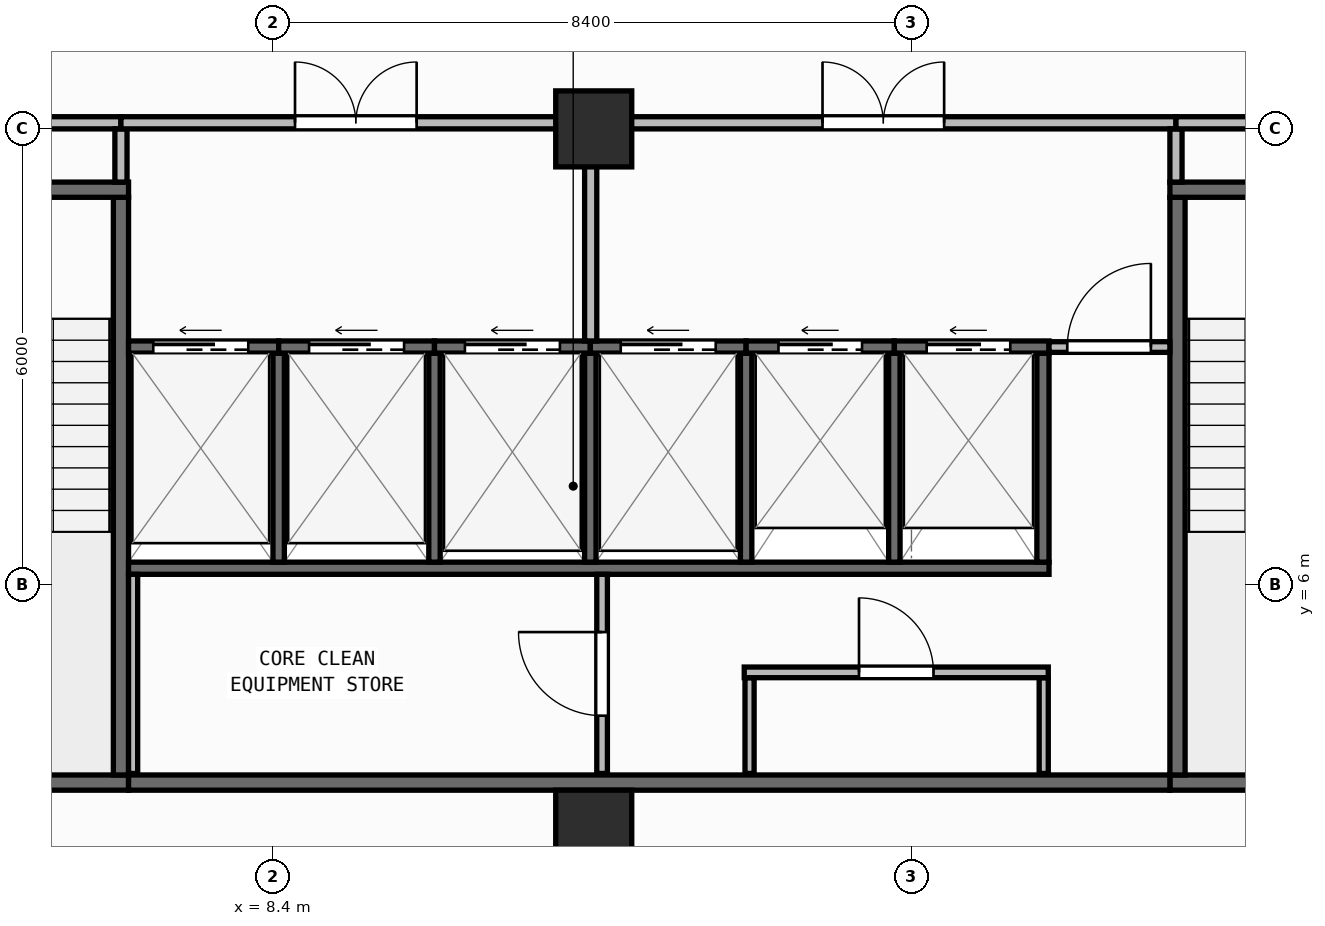
"""IFC4 building model, lengths in metres.
Left out: names, types, materials, properties, quantities, classifications, styles, units other than length and angle.
Written with IfcOpenShell. Run it as: python <this file> out.ifc"""

import sys

from ifc_helpers import new_model, si_unit, direction, frame, frame_2d, origin, origin_2d, place, context, subcontext, project, spatial, rectangle, extrude, element, fill, save


model = new_model("IFC4")
c1 = context("Model", 3, precision=1e-05, world=origin(), true_north=direction((0.0, 1.0)))
c2 = subcontext(c1, "Body", "Model", "MODEL_VIEW")
j1 = project(units=[si_unit("LENGTHUNIT", "METRE"), si_unit("PLANEANGLEUNIT", "RADIAN")], contexts=[c1])
p1 = place(None, origin())
s1 = spatial("IfcSite", under=j1, at=p1, CompositionType="ELEMENT")
p2 = place(p1, origin())
s2 = spatial("IfcBuilding", under=s1, at=p2, CompositionType="ELEMENT")
p3 = place(p2, frame((0.0, 0.0, 215.8)))
s3 = spatial("IfcBuildingStorey", under=s2, at=p3, CompositionType="ELEMENT", Elevation=215.8)
for number, where, z_axis, x_axis in (
    (1, (12.62, 2.8, 0.0), (0.0, 0.0, 1.0), (1.0, 0.0, 0.0)),
    (2, (12.62, 12.0, 0.0), (0.0, 0.0, 1.0), (1.0, 0.0, 0.0)),
):
    element("IfcColumn", number, at=place(p3, frame(where, z_axis=z_axis, x_axis=x_axis)), inside=s3, PredefinedType="COLUMN", context=c2, shape_type="SweptSolid", body=[
        extrude(rectangle(XDim=1.0, YDim=1.0, at=origin_2d()), origin(), (0.0, 0.0, 1.0), 3.95),
    ])
p4 = place(p3, frame((2.66, 0.174, 0.0), z_axis=(0.0, 0.0, 1.0), x_axis=(0.996634028439, 0.081979347142, 0.0)))
e3 = element("IfcWall", 3, at=p4, inside=s3, PredefinedType="STANDARD", context=c2, shape_type="SweptSolid", body=[
    extrude(rectangle(XDim=46.035, YDim=0.26, at=frame_2d((23.018, 0.0))), origin(), (0.0, 0.0, 1.0), 3.71),
])
p5 = place(p4, frame((21.817, 0.0, 0.9)))
e4 = element("IfcOpeningElement", 4, at=p5, cuts=e3, PredefinedType="OPENING", context=c2, shape_type="SweptSolid", body=[
    extrude(rectangle(XDim=2.4, YDim=1.65, at=frame_2d((1.2, 0.825))), frame((0.0, 0.14, 0.0), z_axis=(0.0, -1.0, 0.0), x_axis=(1.0, 0.0, 0.0)), (0.0, 0.0, 1.0), 0.28),
])
p6 = place(p3, frame((2.8, 3.4, 0.0), z_axis=(0.0, 0.0, 1.0), x_axis=(1.0, 0.0, 0.0)))
e5 = element("IfcWall", 5, at=p6, inside=s3, PredefinedType="SHEAR", context=c2, shape_type="SweptSolid", body=[
    extrude(rectangle(XDim=3.7, YDim=0.2, at=frame_2d((1.85, 0.0))), origin(), (0.0, 0.0, 1.0), 3.71),
])
p7 = place(p3, frame((6.4, 3.5, 0.0), z_axis=(0.0, 0.0, 1.0), x_axis=(0.0, 1.0, 0.0)))
e6 = element("IfcWall", 6, at=p7, inside=s3, PredefinedType="SHEAR", context=c2, shape_type="SweptSolid", body=[
    extrude(rectangle(XDim=7.6, YDim=0.2, at=frame_2d((3.8, 0.0))), origin(), (0.0, 0.0, 1.0), 3.71),
])
p8 = place(p3, frame((2.8, 11.2, 0.0), z_axis=(0.0, 0.0, 1.0), x_axis=(1.0, 0.0, 0.0)))
e7 = element("IfcWall", 7, at=p8, inside=s3, PredefinedType="SHEAR", context=c2, shape_type="SweptSolid", body=[
    extrude(rectangle(XDim=3.7, YDim=0.2, at=frame_2d((1.85, 0.0))), origin(), (0.0, 0.0, 1.0), 3.71),
])
p9 = place(p8, frame((1.2, 0.0, 0.0)))
e8 = element("IfcOpeningElement", 8, at=p9, cuts=e7, PredefinedType="OPENING", context=c2, shape_type="SweptSolid", body=[
    extrude(rectangle(XDim=1.3, YDim=2.15, at=frame_2d((0.65, 1.075))), frame((0.0, 0.11, 0.0), z_axis=(0.0, -1.0, 0.0), x_axis=(1.0, 0.0, 0.0)), (0.0, 0.0, 1.0), 0.22),
])
p10 = place(p3, frame((20.2, 3.4, 0.0), z_axis=(0.0, 0.0, 1.0), x_axis=(1.0, 0.0, 0.0)))
e9 = element("IfcWall", 9, at=p10, inside=s3, PredefinedType="SHEAR", context=c2, shape_type="SweptSolid", body=[
    extrude(rectangle(XDim=3.7, YDim=0.2, at=frame_2d((1.85, 0.0))), origin(), (0.0, 0.0, 1.0), 3.71),
])
p11 = place(p3, frame((20.3, 3.5, 0.0), z_axis=(0.0, 0.0, 1.0), x_axis=(0.0, 1.0, 0.0)))
e10 = element("IfcWall", 10, at=p11, inside=s3, PredefinedType="SHEAR", context=c2, shape_type="SweptSolid", body=[
    extrude(rectangle(XDim=7.6, YDim=0.2, at=frame_2d((3.8, 0.0))), origin(), (0.0, 0.0, 1.0), 3.71),
])
p12 = place(p3, frame((20.2, 11.2, 0.0), z_axis=(0.0, 0.0, 1.0), x_axis=(1.0, 0.0, 0.0)))
e11 = element("IfcWall", 11, at=p12, inside=s3, PredefinedType="SHEAR", context=c2, shape_type="SweptSolid", body=[
    extrude(rectangle(XDim=3.7, YDim=0.2, at=frame_2d((1.85, 0.0))), origin(), (0.0, 0.0, 1.0), 3.71),
])
p13 = place(p12, frame((1.2, 0.0, 0.0)))
e12 = element("IfcOpeningElement", 12, at=p13, cuts=e11, PredefinedType="OPENING", context=c2, shape_type="SweptSolid", body=[
    extrude(rectangle(XDim=1.3, YDim=2.15, at=frame_2d((0.65, 1.075))), frame((0.0, 0.11, 0.0), z_axis=(0.0, -1.0, 0.0), x_axis=(1.0, 0.0, 0.0)), (0.0, 0.0, 1.0), 0.22),
])
p14 = place(p3, frame((6.5, 3.4, 0.0), z_axis=(0.0, 0.0, 1.0), x_axis=(1.0, 0.0, 0.0)))
e13 = element("IfcWall", 13, at=p14, inside=s3, PredefinedType="SHEAR", context=c2, shape_type="SweptSolid", body=[
    extrude(rectangle(XDim=13.7, YDim=0.2, at=frame_2d((6.85, 0.0))), origin(), (0.0, 0.0, 1.0), 3.71),
])
p15 = place(p3, frame((6.5, 6.22, 0.0), z_axis=(0.0, 0.0, 1.0), x_axis=(1.0, 0.0, 0.0)))
e14 = element("IfcWall", 14, at=p15, inside=s3, PredefinedType="SHEAR", context=c2, shape_type="SweptSolid", body=[
    extrude(rectangle(XDim=12.11, YDim=0.16, at=frame_2d((6.055, 0.0))), origin(), (0.0, 0.0, 1.0), 3.71),
])
p16 = place(p3, frame((18.53, 6.3, 0.0), z_axis=(0.0, 0.0, 1.0), x_axis=(0.0, 1.0, 0.0)))
e15 = element("IfcWall", 15, at=p16, inside=s3, PredefinedType="SHEAR", context=c2, shape_type="SweptSolid", body=[
    extrude(rectangle(XDim=2.75, YDim=0.16, at=frame_2d((1.375, 0.0))), origin(), (0.0, 0.0, 1.0), 3.71),
])
for number, where, z_axis, x_axis in (
    (16, (8.475, 6.3, 0.0), (0.0, 0.0, 1.0), (0.0, 1.0, 0.0)),
    (17, (10.525, 6.3, 0.0), (0.0, 0.0, 1.0), (0.0, 1.0, 0.0)),
    (18, (12.575, 6.3, 0.0), (0.0, 0.0, 1.0), (0.0, 1.0, 0.0)),
    (19, (14.625, 6.3, 0.0), (0.0, 0.0, 1.0), (0.0, 1.0, 0.0)),
    (20, (16.575, 6.3, 0.0), (0.0, 0.0, 1.0), (0.0, 1.0, 0.0)),
):
    element("IfcWall", number, at=place(p3, frame(where, z_axis=z_axis, x_axis=x_axis)), inside=s3, PredefinedType="SHEAR", context=c2, shape_type="SweptSolid", body=[
        extrude(rectangle(XDim=2.75, YDim=0.15, at=frame_2d((1.375, 0.0))), origin(), (0.0, 0.0, 1.0), 3.71),
    ])
p17 = place(p3, frame((6.5, 9.13, 0.0), z_axis=(0.0, 0.0, 1.0), x_axis=(1.0, 0.0, 0.0)))
e21 = element("IfcWall", 21, at=p17, inside=s3, PredefinedType="SHEAR", context=c2, shape_type="SweptSolid", body=[
    extrude(rectangle(XDim=1.975, YDim=0.16, at=frame_2d((0.988, 0.0))), origin(), (0.0, 0.0, 1.0), 3.71),
])
p18 = place(p17, frame((0.325, 0.0, 0.0)))
e22 = element("IfcOpeningElement", 22, at=p18, cuts=e21, PredefinedType="OPENING", context=c2, shape_type="SweptSolid", body=[
    extrude(rectangle(XDim=1.25, YDim=2.15, at=frame_2d((0.625, 1.075))), frame((0.0, 0.09, 0.0), z_axis=(0.0, -1.0, 0.0), x_axis=(1.0, 0.0, 0.0)), (0.0, 0.0, 1.0), 0.18),
])
p19 = place(p3, frame((8.475, 9.13, 0.0), z_axis=(0.0, 0.0, 1.0), x_axis=(1.0, 0.0, 0.0)))
e23 = element("IfcWall", 23, at=p19, inside=s3, PredefinedType="SHEAR", context=c2, shape_type="SweptSolid", body=[
    extrude(rectangle(XDim=2.05, YDim=0.16, at=frame_2d((1.025, 0.0))), origin(), (0.0, 0.0, 1.0), 3.71),
])
p20 = place(p19, frame((0.4, 0.0, 0.0)))
e24 = element("IfcOpeningElement", 24, at=p20, cuts=e23, PredefinedType="OPENING", context=c2, shape_type="SweptSolid", body=[
    extrude(rectangle(XDim=1.25, YDim=2.15, at=frame_2d((0.625, 1.075))), frame((0.0, 0.09, 0.0), z_axis=(0.0, -1.0, 0.0), x_axis=(1.0, 0.0, 0.0)), (0.0, 0.0, 1.0), 0.18),
])
p21 = place(p3, frame((10.525, 9.13, 0.0), z_axis=(0.0, 0.0, 1.0), x_axis=(1.0, 0.0, 0.0)))
e25 = element("IfcWall", 25, at=p21, inside=s3, PredefinedType="SHEAR", context=c2, shape_type="SweptSolid", body=[
    extrude(rectangle(XDim=2.05, YDim=0.16, at=frame_2d((1.025, 0.0))), origin(), (0.0, 0.0, 1.0), 3.71),
])
p22 = place(p21, frame((0.4, 0.0, 0.0)))
e26 = element("IfcOpeningElement", 26, at=p22, cuts=e25, PredefinedType="OPENING", context=c2, shape_type="SweptSolid", body=[
    extrude(rectangle(XDim=1.25, YDim=2.15, at=frame_2d((0.625, 1.075))), frame((0.0, 0.09, 0.0), z_axis=(0.0, -1.0, 0.0), x_axis=(1.0, 0.0, 0.0)), (0.0, 0.0, 1.0), 0.18),
])
p23 = place(p3, frame((12.575, 9.13, 0.0), z_axis=(0.0, 0.0, 1.0), x_axis=(1.0, 0.0, 0.0)))
e27 = element("IfcWall", 27, at=p23, inside=s3, PredefinedType="SHEAR", context=c2, shape_type="SweptSolid", body=[
    extrude(rectangle(XDim=2.05, YDim=0.16, at=frame_2d((1.025, 0.0))), origin(), (0.0, 0.0, 1.0), 3.71),
])
p24 = place(p23, frame((0.4, 0.0, 0.0)))
e28 = element("IfcOpeningElement", 28, at=p24, cuts=e27, PredefinedType="OPENING", context=c2, shape_type="SweptSolid", body=[
    extrude(rectangle(XDim=1.25, YDim=2.15, at=frame_2d((0.625, 1.075))), frame((0.0, 0.09, 0.0), z_axis=(0.0, -1.0, 0.0), x_axis=(1.0, 0.0, 0.0)), (0.0, 0.0, 1.0), 0.18),
])
p25 = place(p3, frame((14.625, 9.13, 0.0), z_axis=(0.0, 0.0, 1.0), x_axis=(1.0, 0.0, 0.0)))
e29 = element("IfcWall", 29, at=p25, inside=s3, PredefinedType="SHEAR", context=c2, shape_type="SweptSolid", body=[
    extrude(rectangle(XDim=1.95, YDim=0.16, at=frame_2d((0.975, 0.0))), origin(), (0.0, 0.0, 1.0), 3.71),
])
p26 = place(p25, frame((0.425, 0.0, 0.0)))
e30 = element("IfcOpeningElement", 30, at=p26, cuts=e29, PredefinedType="OPENING", context=c2, shape_type="SweptSolid", body=[
    extrude(rectangle(XDim=1.1, YDim=2.15, at=frame_2d((0.55, 1.075))), frame((0.0, 0.09, 0.0), z_axis=(0.0, -1.0, 0.0), x_axis=(1.0, 0.0, 0.0)), (0.0, 0.0, 1.0), 0.18),
])
p27 = place(p3, frame((16.575, 9.13, 0.0), z_axis=(0.0, 0.0, 1.0), x_axis=(1.0, 0.0, 0.0)))
e31 = element("IfcWall", 31, at=p27, inside=s3, PredefinedType="SHEAR", context=c2, shape_type="SweptSolid", body=[
    extrude(rectangle(XDim=2.035, YDim=0.16, at=frame_2d((1.018, 0.0))), origin(), (0.0, 0.0, 1.0), 3.71),
])
p28 = place(p27, frame((0.425, 0.0, 0.0)))
e32 = element("IfcOpeningElement", 32, at=p28, cuts=e31, PredefinedType="OPENING", context=c2, shape_type="SweptSolid", body=[
    extrude(rectangle(XDim=1.1, YDim=2.15, at=frame_2d((0.55, 1.075))), frame((0.0, 0.09, 0.0), z_axis=(0.0, -1.0, 0.0), x_axis=(1.0, 0.0, 0.0)), (0.0, 0.0, 1.0), 0.18),
])
p29 = place(p3, frame((6.56, 3.52, 0.0), z_axis=(0.0, 0.0, 1.0), x_axis=(0.0, 1.0, 0.0)))
e33 = element("IfcWall", 33, at=p29, inside=s3, PredefinedType="PARTITIONING", context=c2, shape_type="SweptSolid", body=[
    extrude(rectangle(XDim=2.62, YDim=0.12, at=frame_2d((1.31, 0.0))), origin(), (0.0, 0.0, 1.0), 3.71),
])
p30 = place(p3, frame((12.73, 3.52, 0.0), z_axis=(0.0, 0.0, 1.0), x_axis=(0.0, 1.0, 0.0)))
e34 = element("IfcWall", 34, at=p30, inside=s3, PredefinedType="PARTITIONING", context=c2, shape_type="SweptSolid", body=[
    extrude(rectangle(XDim=2.62, YDim=0.14, at=frame_2d((1.31, 0.0))), origin(), (0.0, 0.0, 1.0), 3.71),
])
p31 = place(p30, frame((0.76, 0.0, 0.0)))
e35 = element("IfcOpeningElement", 35, at=p31, cuts=e34, PredefinedType="OPENING", context=c2, shape_type="SweptSolid", body=[
    extrude(rectangle(XDim=1.1, YDim=2.1, at=frame_2d((0.55, 1.05))), frame((0.0, 0.08, 0.0), z_axis=(0.0, -1.0, 0.0), x_axis=(1.0, 0.0, 0.0)), (0.0, 0.0, 1.0), 0.16),
])
for number, where, z_axis, x_axis in (
    (36, (14.67, 3.52, 0.0), (0.0, 0.0, 1.0), (0.0, 1.0, 0.0)),
    (37, (18.54, 3.52, 0.0), (0.0, 0.0, 1.0), (0.0, 1.0, 0.0)),
):
    element("IfcWall", number, at=place(p3, frame(where, z_axis=z_axis, x_axis=x_axis)), inside=s3, PredefinedType="PARTITIONING", context=c2, shape_type="SweptSolid", body=[
        extrude(rectangle(XDim=1.26, YDim=0.12, at=frame_2d((0.63, 0.0))), origin(), (0.0, 0.0, 1.0), 3.71),
    ])
p32 = place(p3, frame((14.6, 4.85, 0.0), z_axis=(0.0, 0.0, 1.0), x_axis=(1.0, 0.0, 0.0)))
e38 = element("IfcWall", 38, at=p32, inside=s3, PredefinedType="PARTITIONING", context=c2, shape_type="SweptSolid", body=[
    extrude(rectangle(XDim=4.0, YDim=0.14, at=frame_2d((2.0, 0.0))), origin(), (0.0, 0.0, 1.0), 3.71),
])
p33 = place(p32, frame((1.51, 0.0, 0.0)))
e39 = element("IfcOpeningElement", 39, at=p33, cuts=e38, PredefinedType="OPENING", context=c2, shape_type="SweptSolid", body=[
    extrude(rectangle(XDim=0.98, YDim=2.1, at=frame_2d((0.49, 1.05))), frame((0.0, 0.08, 0.0), z_axis=(0.0, -1.0, 0.0), x_axis=(1.0, 0.0, 0.0)), (0.0, 0.0, 1.0), 0.16),
])
p34 = place(p3, frame((18.61, 9.13, 0.0), z_axis=(0.0, 0.0, 1.0), x_axis=(1.0, 0.0, 0.0)))
e40 = element("IfcWall", 40, at=p34, inside=s3, PredefinedType="PARTITIONING", context=c2, shape_type="SweptSolid", body=[
    extrude(rectangle(XDim=1.59, YDim=0.14, at=frame_2d((0.795, 0.0))), origin(), (0.0, 0.0, 1.0), 3.71),
])
p35 = place(p34, frame((0.24, 0.0, 0.0)))
e41 = element("IfcOpeningElement", 41, at=p35, cuts=e40, PredefinedType="OPENING", context=c2, shape_type="SweptSolid", body=[
    extrude(rectangle(XDim=1.1, YDim=2.1, at=frame_2d((0.55, 1.05))), frame((0.0, 0.08, 0.0), z_axis=(0.0, -1.0, 0.0), x_axis=(1.0, 0.0, 0.0)), (0.0, 0.0, 1.0), 0.16),
])
p36 = place(p3, frame((2.8, 12.08, 0.0), z_axis=(0.0, 0.0, 1.0), x_axis=(1.0, 0.0, 0.0)))
e42 = element("IfcWall", 42, at=p36, inside=s3, PredefinedType="PARTITIONING", context=c2, shape_type="SweptSolid", body=[
    extrude(rectangle(XDim=3.6, YDim=0.16, at=frame_2d((1.8, 0.0))), origin(), (0.0, 0.0, 1.0), 3.152),
])
p37 = place(p36, frame((1.0, 0.0, 0.0)))
e43 = element("IfcOpeningElement", 43, at=p37, cuts=e42, PredefinedType="OPENING", context=c2, shape_type="SweptSolid", body=[
    extrude(rectangle(XDim=1.6, YDim=2.05, at=frame_2d((0.8, 1.025))), frame((0.0, 0.09, 0.0), z_axis=(0.0, -1.0, 0.0), x_axis=(1.0, 0.0, 0.0)), (0.0, 0.0, 1.0), 0.18),
])
p38 = place(p3, frame((6.4, 11.3, 0.0), z_axis=(0.0, 0.0, 1.0), x_axis=(0.0, 1.0, 0.0)))
e44 = element("IfcWall", 44, at=p38, inside=s3, PredefinedType="PARTITIONING", context=c2, shape_type="SweptSolid", body=[
    extrude(rectangle(XDim=0.7, YDim=0.16, at=frame_2d((0.35, 0.0))), origin(), (0.0, 0.0, 1.0), 3.71),
])
p39 = place(p3, frame((6.4, 12.08, 0.0), z_axis=(0.0, 0.0, 1.0), x_axis=(1.0, 0.0, 0.0)))
e45 = element("IfcWall", 45, at=p39, inside=s3, PredefinedType="PARTITIONING", context=c2, shape_type="SweptSolid", body=[
    extrude(rectangle(XDim=6.18, YDim=0.16, at=frame_2d((3.09, 0.0))), origin(), (0.0, 0.0, 1.0), 3.152),
])
p40 = place(p39, frame((2.29, 0.0, 0.0)))
e46 = element("IfcOpeningElement", 46, at=p40, cuts=e45, PredefinedType="OPENING", context=c2, shape_type="SweptSolid", body=[
    extrude(rectangle(XDim=1.6, YDim=2.05, at=frame_2d((0.8, 1.025))), frame((0.0, 0.09, 0.0), z_axis=(0.0, -1.0, 0.0), x_axis=(1.0, 0.0, 0.0)), (0.0, 0.0, 1.0), 0.18),
])
p41 = place(p3, frame((12.58, 9.21, 0.0), z_axis=(0.0, 0.0, 1.0), x_axis=(0.0, 1.0, 0.0)))
e47 = element("IfcWall", 47, at=p41, inside=s3, PredefinedType="PARTITIONING", context=c2, shape_type="SweptSolid", body=[
    extrude(rectangle(XDim=2.79, YDim=0.16, at=frame_2d((1.395, 0.0))), origin(), (0.0, 0.0, 1.0), 3.71),
])
p42 = place(p3, frame((12.58, 12.08, 0.0), z_axis=(0.0, 0.0, 1.0), x_axis=(1.0, 0.0, 0.0)))
e48 = element("IfcWall", 48, at=p42, inside=s3, PredefinedType="PARTITIONING", context=c2, shape_type="SweptSolid", body=[
    extrude(rectangle(XDim=7.7, YDim=0.16, at=frame_2d((3.85, 0.0))), origin(), (0.0, 0.0, 1.0), 3.152),
])
p43 = place(p42, frame((3.05, 0.0, 0.0)))
e49 = element("IfcOpeningElement", 49, at=p43, cuts=e48, PredefinedType="OPENING", context=c2, shape_type="SweptSolid", body=[
    extrude(rectangle(XDim=1.6, YDim=2.05, at=frame_2d((0.8, 1.025))), frame((0.0, 0.09, 0.0), z_axis=(0.0, -1.0, 0.0), x_axis=(1.0, 0.0, 0.0)), (0.0, 0.0, 1.0), 0.18),
])
p44 = place(p3, frame((20.28, 11.3, 0.0), z_axis=(0.0, 0.0, 1.0), x_axis=(0.0, 1.0, 0.0)))
e50 = element("IfcWall", 50, at=p44, inside=s3, PredefinedType="PARTITIONING", context=c2, shape_type="SweptSolid", body=[
    extrude(rectangle(XDim=0.7, YDim=0.16, at=frame_2d((0.35, 0.0))), origin(), (0.0, 0.0, 1.0), 3.71),
])
p45 = place(p3, frame((20.28, 12.08, 0.0), z_axis=(0.0, 0.0, 1.0), x_axis=(1.0, 0.0, 0.0)))
e51 = element("IfcWall", 51, at=p45, inside=s3, PredefinedType="PARTITIONING", context=c2, shape_type="SweptSolid", body=[
    extrude(rectangle(XDim=3.62, YDim=0.16, at=frame_2d((1.81, 0.0))), origin(), (0.0, 0.0, 1.0), 3.152),
])
p46 = place(p45, frame((1.01, 0.0, 0.0)))
e52 = element("IfcOpeningElement", 52, at=p46, cuts=e51, PredefinedType="OPENING", context=c2, shape_type="SweptSolid", body=[
    extrude(rectangle(XDim=1.6, YDim=2.05, at=frame_2d((0.8, 1.025))), frame((0.0, 0.09, 0.0), z_axis=(0.0, -1.0, 0.0), x_axis=(1.0, 0.0, 0.0)), (0.0, 0.0, 1.0), 0.18),
])
p47 = place(p18, origin())
e53 = element("IfcDoor", 53, at=p47, inside=s3, OperationType="SLIDING_TO_LEFT", PredefinedType="DOOR", context=c2, shape_type="SweptSolid", body=[
    extrude(rectangle(XDim=1.25, YDim=2.15, at=frame_2d((0.625, 1.075))), frame((0.0, 0.025, 0.0), z_axis=(0.0, -1.0, 0.0), x_axis=(1.0, 0.0, 0.0)), (0.0, 0.0, 1.0), 0.05),
])
fill(e22, e53)
p48 = place(p20, origin())
e54 = element("IfcDoor", 54, at=p48, inside=s3, OperationType="SLIDING_TO_LEFT", PredefinedType="DOOR", context=c2, shape_type="SweptSolid", body=[
    extrude(rectangle(XDim=1.25, YDim=2.15, at=frame_2d((0.625, 1.075))), frame((0.0, 0.025, 0.0), z_axis=(0.0, -1.0, 0.0), x_axis=(1.0, 0.0, 0.0)), (0.0, 0.0, 1.0), 0.05),
])
fill(e24, e54)
p49 = place(p22, origin())
e55 = element("IfcDoor", 55, at=p49, inside=s3, OperationType="SLIDING_TO_LEFT", PredefinedType="DOOR", context=c2, shape_type="SweptSolid", body=[
    extrude(rectangle(XDim=1.25, YDim=2.15, at=frame_2d((0.625, 1.075))), frame((0.0, 0.025, 0.0), z_axis=(0.0, -1.0, 0.0), x_axis=(1.0, 0.0, 0.0)), (0.0, 0.0, 1.0), 0.05),
])
fill(e26, e55)
p50 = place(p24, origin())
e56 = element("IfcDoor", 56, at=p50, inside=s3, OperationType="SLIDING_TO_LEFT", PredefinedType="DOOR", context=c2, shape_type="SweptSolid", body=[
    extrude(rectangle(XDim=1.25, YDim=2.15, at=frame_2d((0.625, 1.075))), frame((0.0, 0.025, 0.0), z_axis=(0.0, -1.0, 0.0), x_axis=(1.0, 0.0, 0.0)), (0.0, 0.0, 1.0), 0.05),
])
fill(e28, e56)
p51 = place(p26, origin())
e57 = element("IfcDoor", 57, at=p51, inside=s3, OperationType="SLIDING_TO_LEFT", PredefinedType="DOOR", context=c2, shape_type="SweptSolid", body=[
    extrude(rectangle(XDim=1.1, YDim=2.15, at=frame_2d((0.55, 1.075))), frame((0.0, 0.025, 0.0), z_axis=(0.0, -1.0, 0.0), x_axis=(1.0, 0.0, 0.0)), (0.0, 0.0, 1.0), 0.05),
])
fill(e30, e57)
p52 = place(p28, origin())
e58 = element("IfcDoor", 58, at=p52, inside=s3, OperationType="SLIDING_TO_LEFT", PredefinedType="DOOR", context=c2, shape_type="SweptSolid", body=[
    extrude(rectangle(XDim=1.1, YDim=2.15, at=frame_2d((0.55, 1.075))), frame((0.0, 0.025, 0.0), z_axis=(0.0, -1.0, 0.0), x_axis=(1.0, 0.0, 0.0)), (0.0, 0.0, 1.0), 0.05),
])
fill(e32, e58)
p53 = place(p31, origin())
e59 = element("IfcDoor", 59, at=p53, inside=s3, OperationType="SINGLE_SWING_RIGHT", PredefinedType="DOOR", context=c2, shape_type="SweptSolid", body=[
    extrude(rectangle(XDim=1.1, YDim=2.1, at=frame_2d((0.55, 1.05))), frame((0.0, 0.025, 0.0), z_axis=(0.0, -1.0, 0.0), x_axis=(1.0, 0.0, 0.0)), (0.0, 0.0, 1.0), 0.05),
])
fill(e35, e59)
p54 = place(p33, origin())
e60 = element("IfcDoor", 60, at=p54, inside=s3, OperationType="SINGLE_SWING_LEFT", PredefinedType="DOOR", context=c2, shape_type="SweptSolid", body=[
    extrude(rectangle(XDim=0.98, YDim=2.1, at=frame_2d((0.49, 1.05))), frame((0.0, 0.025, 0.0), z_axis=(0.0, -1.0, 0.0), x_axis=(1.0, 0.0, 0.0)), (0.0, 0.0, 1.0), 0.05),
])
fill(e39, e60)
p55 = place(p35, origin())
e61 = element("IfcDoor", 61, at=p55, inside=s3, OperationType="SINGLE_SWING_RIGHT", PredefinedType="DOOR", context=c2, shape_type="SweptSolid", body=[
    extrude(rectangle(XDim=1.1, YDim=2.1, at=frame_2d((0.55, 1.05))), frame((0.0, 0.025, 0.0), z_axis=(0.0, -1.0, 0.0), x_axis=(1.0, 0.0, 0.0)), (0.0, 0.0, 1.0), 0.05),
])
fill(e41, e61)
p56 = place(p40, origin())
e62 = element("IfcDoor", 62, at=p56, inside=s3, OperationType="DOUBLE_DOOR_SINGLE_SWING", PredefinedType="DOOR", context=c2, shape_type="SweptSolid", body=[
    extrude(rectangle(XDim=1.6, YDim=2.05, at=frame_2d((0.8, 1.025))), frame((0.0, 0.025, 0.0), z_axis=(0.0, -1.0, 0.0), x_axis=(1.0, 0.0, 0.0)), (0.0, 0.0, 1.0), 0.05),
])
fill(e46, e62)
p57 = place(p43, origin())
e63 = element("IfcDoor", 63, at=p57, inside=s3, OperationType="DOUBLE_DOOR_SINGLE_SWING", PredefinedType="DOOR", context=c2, shape_type="SweptSolid", body=[
    extrude(rectangle(XDim=1.6, YDim=2.05, at=frame_2d((0.8, 1.025))), frame((0.0, 0.025, 0.0), z_axis=(0.0, -1.0, 0.0), x_axis=(1.0, 0.0, 0.0)), (0.0, 0.0, 1.0), 0.05),
])
fill(e49, e63)
save(model, sys.argv[1])
